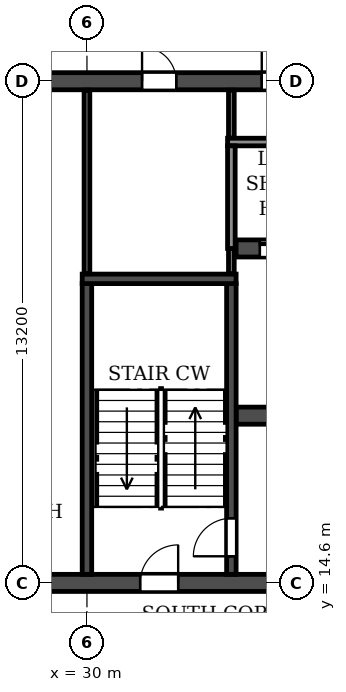
"""IFC4 building model, lengths in metres.
Left out: names, types, materials, properties, quantities, classifications, styles, units other than length and angle.
Written with IfcOpenShell. Run it as: python <this file> out.ifc"""

import sys

from ifc_helpers import new_model, si_unit, direction, frame, frame_2d, origin, place, context, subcontext, project, spatial, rectangle, extrude, element, fill, save


model = new_model("IFC4")
c1 = context("Model", 3, precision=1e-05, world=origin(), true_north=direction((0.0, 1.0)))
c2 = subcontext(c1, "Body", "Model", "MODEL_VIEW")
j1 = project(units=[si_unit("LENGTHUNIT", "METRE"), si_unit("PLANEANGLEUNIT", "RADIAN")], contexts=[c1])
p1 = place(None, origin())
s1 = spatial("IfcSite", under=j1, at=p1, CompositionType="ELEMENT")
p2 = place(p1, origin())
s2 = spatial("IfcBuilding", under=s1, at=p2, CompositionType="ELEMENT")
p3 = place(p2, frame((0.0, 0.0, 132.3)))
s3 = spatial("IfcBuildingStorey", under=s2, at=p3, CompositionType="ELEMENT", Elevation=132.3)
p4 = place(p3, frame((12.2, 14.6, 0.0), z_axis=(0.0, 0.0, 1.0), x_axis=(1.0, 0.0, 0.0)))
e1 = element("IfcWall", 1, at=p4, inside=s3, PredefinedType="SOLIDWALL", context=c2, shape_type="SweptSolid", body=[
    extrude(rectangle(XDim=77.6, YDim=0.45, at=frame_2d((38.8, 0.0))), origin(), (0.0, 0.0, 1.0), 3.07),
])
p5 = place(p4, frame((2.3, 0.0, 0.0)))
e2 = element("IfcOpeningElement", 2, at=p5, cuts=e1, PredefinedType="OPENING", context=c2, shape_type="SweptSolid", body=[
    extrude(rectangle(XDim=1.0, YDim=2.1, at=frame_2d((0.5, 1.05))), frame((0.0, 0.235, 0.0), z_axis=(0.0, -1.0, 0.0), x_axis=(1.0, 0.0, 0.0)), (0.0, 0.0, 1.0), 0.47),
])
p6 = place(p4, frame((6.7, 0.0, 0.0)))
e3 = element("IfcOpeningElement", 3, at=p6, cuts=e1, PredefinedType="OPENING", context=c2, shape_type="SweptSolid", body=[
    extrude(rectangle(XDim=1.0, YDim=2.1, at=frame_2d((0.5, 1.05))), frame((0.0, 0.235, 0.0), z_axis=(0.0, -1.0, 0.0), x_axis=(1.0, 0.0, 0.0)), (0.0, 0.0, 1.0), 0.47),
])
p7 = place(p4, frame((14.6, 0.0, 0.0)))
e4 = element("IfcOpeningElement", 4, at=p7, cuts=e1, PredefinedType="OPENING", context=c2, shape_type="SweptSolid", body=[
    extrude(rectangle(XDim=1.0, YDim=2.1, at=frame_2d((0.5, 1.05))), frame((0.0, 0.235, 0.0), z_axis=(0.0, -1.0, 0.0), x_axis=(1.0, 0.0, 0.0)), (0.0, 0.0, 1.0), 0.47),
])
p8 = place(p4, frame((19.2, 0.0, 0.0)))
e5 = element("IfcOpeningElement", 5, at=p8, cuts=e1, PredefinedType="OPENING", context=c2, shape_type="SweptSolid", body=[
    extrude(rectangle(XDim=1.0, YDim=2.1, at=frame_2d((0.5, 1.05))), frame((0.0, 0.235, 0.0), z_axis=(0.0, -1.0, 0.0), x_axis=(1.0, 0.0, 0.0)), (0.0, 0.0, 1.0), 0.47),
])
p9 = place(p4, frame((31.55, 0.0, 0.0)))
e6 = element("IfcOpeningElement", 6, at=p9, cuts=e1, PredefinedType="OPENING", context=c2, shape_type="SweptSolid", body=[
    extrude(rectangle(XDim=1.5, YDim=2.1, at=frame_2d((0.75, 1.05))), frame((0.0, 0.235, 0.0), z_axis=(0.0, -1.0, 0.0), x_axis=(1.0, 0.0, 0.0)), (0.0, 0.0, 1.0), 0.47),
])
p10 = place(p4, frame((35.7, 0.0, 0.0)))
e7 = element("IfcOpeningElement", 7, at=p10, cuts=e1, PredefinedType="OPENING", context=c2, shape_type="SweptSolid", body=[
    extrude(rectangle(XDim=1.0, YDim=2.1, at=frame_2d((0.5, 1.05))), frame((0.0, 0.235, 0.0), z_axis=(0.0, -1.0, 0.0), x_axis=(1.0, 0.0, 0.0)), (0.0, 0.0, 1.0), 0.47),
])
p11 = place(p4, frame((38.3, 0.0, 0.0)))
e8 = element("IfcOpeningElement", 8, at=p11, cuts=e1, PredefinedType="OPENING", context=c2, shape_type="SweptSolid", body=[
    extrude(rectangle(XDim=1.0, YDim=2.1, at=frame_2d((0.5, 1.05))), frame((0.0, 0.235, 0.0), z_axis=(0.0, -1.0, 0.0), x_axis=(1.0, 0.0, 0.0)), (0.0, 0.0, 1.0), 0.47),
])
p12 = place(p4, frame((40.9, 0.0, 0.0)))
e9 = element("IfcOpeningElement", 9, at=p12, cuts=e1, PredefinedType="OPENING", context=c2, shape_type="SweptSolid", body=[
    extrude(rectangle(XDim=1.0, YDim=2.1, at=frame_2d((0.5, 1.05))), frame((0.0, 0.235, 0.0), z_axis=(0.0, -1.0, 0.0), x_axis=(1.0, 0.0, 0.0)), (0.0, 0.0, 1.0), 0.47),
])
p13 = place(p4, frame((44.55, 0.0, 0.0)))
e10 = element("IfcOpeningElement", 10, at=p13, cuts=e1, PredefinedType="OPENING", context=c2, shape_type="SweptSolid", body=[
    extrude(rectangle(XDim=1.5, YDim=2.1, at=frame_2d((0.75, 1.05))), frame((0.0, 0.235, 0.0), z_axis=(0.0, -1.0, 0.0), x_axis=(1.0, 0.0, 0.0)), (0.0, 0.0, 1.0), 0.47),
])
p14 = place(p4, frame((57.4, 0.0, 0.0)))
e11 = element("IfcOpeningElement", 11, at=p14, cuts=e1, PredefinedType="OPENING", context=c2, shape_type="SweptSolid", body=[
    extrude(rectangle(XDim=1.0, YDim=2.1, at=frame_2d((0.5, 1.05))), frame((0.0, 0.235, 0.0), z_axis=(0.0, -1.0, 0.0), x_axis=(1.0, 0.0, 0.0)), (0.0, 0.0, 1.0), 0.47),
])
p15 = place(p4, frame((62.0, 0.0, 0.0)))
e12 = element("IfcOpeningElement", 12, at=p15, cuts=e1, PredefinedType="OPENING", context=c2, shape_type="SweptSolid", body=[
    extrude(rectangle(XDim=1.0, YDim=2.1, at=frame_2d((0.5, 1.05))), frame((0.0, 0.235, 0.0), z_axis=(0.0, -1.0, 0.0), x_axis=(1.0, 0.0, 0.0)), (0.0, 0.0, 1.0), 0.47),
])
p16 = place(p4, frame((69.9, 0.0, 0.0)))
e13 = element("IfcOpeningElement", 13, at=p16, cuts=e1, PredefinedType="OPENING", context=c2, shape_type="SweptSolid", body=[
    extrude(rectangle(XDim=1.0, YDim=2.1, at=frame_2d((0.5, 1.05))), frame((0.0, 0.235, 0.0), z_axis=(0.0, -1.0, 0.0), x_axis=(1.0, 0.0, 0.0)), (0.0, 0.0, 1.0), 0.47),
])
p17 = place(p4, frame((74.3, 0.0, 0.0)))
e14 = element("IfcOpeningElement", 14, at=p17, cuts=e1, PredefinedType="OPENING", context=c2, shape_type="SweptSolid", body=[
    extrude(rectangle(XDim=1.0, YDim=2.1, at=frame_2d((0.5, 1.05))), frame((0.0, 0.235, 0.0), z_axis=(0.0, -1.0, 0.0), x_axis=(1.0, 0.0, 0.0)), (0.0, 0.0, 1.0), 0.47),
])
p18 = place(p3, frame((12.2, 27.8, 0.0), z_axis=(0.0, 0.0, 1.0), x_axis=(1.0, 0.0, 0.0)))
e15 = element("IfcWall", 15, at=p18, inside=s3, PredefinedType="SOLIDWALL", context=c2, shape_type="SweptSolid", body=[
    extrude(rectangle(XDim=77.6, YDim=0.45, at=frame_2d((38.8, 0.0))), origin(), (0.0, 0.0, 1.0), 3.07),
])
p19 = place(p18, frame((2.05, 0.0, 0.0)))
e16 = element("IfcOpeningElement", 16, at=p19, cuts=e15, PredefinedType="OPENING", context=c2, shape_type="SweptSolid", body=[
    extrude(rectangle(XDim=1.5, YDim=2.1, at=frame_2d((0.75, 1.05))), frame((0.0, 0.235, 0.0), z_axis=(0.0, -1.0, 0.0), x_axis=(1.0, 0.0, 0.0)), (0.0, 0.0, 1.0), 0.47),
])
p20 = place(p18, frame((6.7, 0.0, 0.0)))
e17 = element("IfcOpeningElement", 17, at=p20, cuts=e15, PredefinedType="OPENING", context=c2, shape_type="SweptSolid", body=[
    extrude(rectangle(XDim=1.0, YDim=2.1, at=frame_2d((0.5, 1.05))), frame((0.0, 0.235, 0.0), z_axis=(0.0, -1.0, 0.0), x_axis=(1.0, 0.0, 0.0)), (0.0, 0.0, 1.0), 0.47),
])
p21 = place(p18, frame((10.05, 0.0, 0.0)))
e18 = element("IfcOpeningElement", 18, at=p21, cuts=e15, PredefinedType="OPENING", context=c2, shape_type="SweptSolid", body=[
    extrude(rectangle(XDim=0.9, YDim=2.1, at=frame_2d((0.45, 1.05))), frame((0.0, 0.235, 0.0), z_axis=(0.0, -1.0, 0.0), x_axis=(1.0, 0.0, 0.0)), (0.0, 0.0, 1.0), 0.47),
])
p22 = place(p18, frame((19.25, 0.0, 0.0)))
e19 = element("IfcOpeningElement", 19, at=p22, cuts=e15, PredefinedType="OPENING", context=c2, shape_type="SweptSolid", body=[
    extrude(rectangle(XDim=0.9, YDim=2.1, at=frame_2d((0.45, 1.05))), frame((0.0, 0.235, 0.0), z_axis=(0.0, -1.0, 0.0), x_axis=(1.0, 0.0, 0.0)), (0.0, 0.0, 1.0), 0.47),
])
p23 = place(p18, frame((22.4, 0.0, 0.0)))
e20 = element("IfcOpeningElement", 20, at=p23, cuts=e15, PredefinedType="OPENING", context=c2, shape_type="SweptSolid", body=[
    extrude(rectangle(XDim=1.0, YDim=2.1, at=frame_2d((0.5, 1.05))), frame((0.0, 0.235, 0.0), z_axis=(0.0, -1.0, 0.0), x_axis=(1.0, 0.0, 0.0)), (0.0, 0.0, 1.0), 0.47),
])
p24 = place(p18, frame((27.6, 0.0, 0.0)))
e21 = element("IfcOpeningElement", 21, at=p24, cuts=e15, PredefinedType="OPENING", context=c2, shape_type="SweptSolid", body=[
    extrude(rectangle(XDim=1.0, YDim=2.1, at=frame_2d((0.5, 1.05))), frame((0.0, 0.235, 0.0), z_axis=(0.0, -1.0, 0.0), x_axis=(1.0, 0.0, 0.0)), (0.0, 0.0, 1.0), 0.47),
])
p25 = place(p18, frame((35.4, 0.0, 0.0)))
e22 = element("IfcOpeningElement", 22, at=p25, cuts=e15, PredefinedType="OPENING", context=c2, shape_type="SweptSolid", body=[
    extrude(rectangle(XDim=1.0, YDim=2.1, at=frame_2d((0.5, 1.05))), frame((0.0, 0.235, 0.0), z_axis=(0.0, -1.0, 0.0), x_axis=(1.0, 0.0, 0.0)), (0.0, 0.0, 1.0), 0.47),
])
p26 = place(p18, frame((38.3, 0.0, 0.0)))
e23 = element("IfcOpeningElement", 23, at=p26, cuts=e15, PredefinedType="OPENING", context=c2, shape_type="SweptSolid", body=[
    extrude(rectangle(XDim=1.0, YDim=2.1, at=frame_2d((0.5, 1.05))), frame((0.0, 0.235, 0.0), z_axis=(0.0, -1.0, 0.0), x_axis=(1.0, 0.0, 0.0)), (0.0, 0.0, 1.0), 0.47),
])
p27 = place(p18, frame((41.2, 0.0, 0.0)))
e24 = element("IfcOpeningElement", 24, at=p27, cuts=e15, PredefinedType="OPENING", context=c2, shape_type="SweptSolid", body=[
    extrude(rectangle(XDim=1.0, YDim=2.1, at=frame_2d((0.5, 1.05))), frame((0.0, 0.235, 0.0), z_axis=(0.0, -1.0, 0.0), x_axis=(1.0, 0.0, 0.0)), (0.0, 0.0, 1.0), 0.47),
])
p28 = place(p18, frame((43.8, 0.0, 0.0)))
e25 = element("IfcOpeningElement", 25, at=p28, cuts=e15, PredefinedType="OPENING", context=c2, shape_type="SweptSolid", body=[
    extrude(rectangle(XDim=1.0, YDim=2.1, at=frame_2d((0.5, 1.05))), frame((0.0, 0.235, 0.0), z_axis=(0.0, -1.0, 0.0), x_axis=(1.0, 0.0, 0.0)), (0.0, 0.0, 1.0), 0.47),
])
p29 = place(p18, frame((47.7, 0.0, 0.0)))
e26 = element("IfcOpeningElement", 26, at=p29, cuts=e15, PredefinedType="OPENING", context=c2, shape_type="SweptSolid", body=[
    extrude(rectangle(XDim=1.0, YDim=2.1, at=frame_2d((0.5, 1.05))), frame((0.0, 0.235, 0.0), z_axis=(0.0, -1.0, 0.0), x_axis=(1.0, 0.0, 0.0)), (0.0, 0.0, 1.0), 0.47),
])
p30 = place(p18, frame((51.6, 0.0, 0.0)))
e27 = element("IfcOpeningElement", 27, at=p30, cuts=e15, PredefinedType="OPENING", context=c2, shape_type="SweptSolid", body=[
    extrude(rectangle(XDim=1.0, YDim=2.1, at=frame_2d((0.5, 1.05))), frame((0.0, 0.235, 0.0), z_axis=(0.0, -1.0, 0.0), x_axis=(1.0, 0.0, 0.0)), (0.0, 0.0, 1.0), 0.47),
])
p31 = place(p18, frame((54.2, 0.0, 0.0)))
e28 = element("IfcOpeningElement", 28, at=p31, cuts=e15, PredefinedType="OPENING", context=c2, shape_type="SweptSolid", body=[
    extrude(rectangle(XDim=1.0, YDim=2.1, at=frame_2d((0.5, 1.05))), frame((0.0, 0.235, 0.0), z_axis=(0.0, -1.0, 0.0), x_axis=(1.0, 0.0, 0.0)), (0.0, 0.0, 1.0), 0.47),
])
p32 = place(p18, frame((57.45, 0.0, 0.0)))
e29 = element("IfcOpeningElement", 29, at=p32, cuts=e15, PredefinedType="OPENING", context=c2, shape_type="SweptSolid", body=[
    extrude(rectangle(XDim=0.9, YDim=2.1, at=frame_2d((0.45, 1.05))), frame((0.0, 0.235, 0.0), z_axis=(0.0, -1.0, 0.0), x_axis=(1.0, 0.0, 0.0)), (0.0, 0.0, 1.0), 0.47),
])
p33 = place(p18, frame((66.65, 0.0, 0.0)))
e30 = element("IfcOpeningElement", 30, at=p33, cuts=e15, PredefinedType="OPENING", context=c2, shape_type="SweptSolid", body=[
    extrude(rectangle(XDim=0.9, YDim=2.1, at=frame_2d((0.45, 1.05))), frame((0.0, 0.235, 0.0), z_axis=(0.0, -1.0, 0.0), x_axis=(1.0, 0.0, 0.0)), (0.0, 0.0, 1.0), 0.47),
])
p34 = place(p18, frame((69.9, 0.0, 0.0)))
e31 = element("IfcOpeningElement", 31, at=p34, cuts=e15, PredefinedType="OPENING", context=c2, shape_type="SweptSolid", body=[
    extrude(rectangle(XDim=1.0, YDim=2.1, at=frame_2d((0.5, 1.05))), frame((0.0, 0.235, 0.0), z_axis=(0.0, -1.0, 0.0), x_axis=(1.0, 0.0, 0.0)), (0.0, 0.0, 1.0), 0.47),
])
p35 = place(p18, frame((74.3, 0.0, 0.0)))
e32 = element("IfcOpeningElement", 32, at=p35, cuts=e15, PredefinedType="OPENING", context=c2, shape_type="SweptSolid", body=[
    extrude(rectangle(XDim=1.0, YDim=2.1, at=frame_2d((0.5, 1.05))), frame((0.0, 0.235, 0.0), z_axis=(0.0, -1.0, 0.0), x_axis=(1.0, 0.0, 0.0)), (0.0, 0.0, 1.0), 0.47),
])
p36 = place(p3, frame((33.925, 19.0, 0.0), z_axis=(0.0, 0.0, 1.0), x_axis=(1.0, 0.0, 0.0)))
e33 = element("IfcWall", 33, at=p36, inside=s3, PredefinedType="SOLIDWALL", context=c2, shape_type="SweptSolid", body=[
    extrude(rectangle(XDim=34.15, YDim=0.45, at=frame_2d((17.075, 0.0))), origin(), (0.0, 0.0, 1.0), 3.07),
])
p37 = place(p36, frame((16.175, 0.0, 0.0)))
e34 = element("IfcOpeningElement", 34, at=p37, cuts=e33, PredefinedType="OPENING", context=c2, shape_type="SweptSolid", body=[
    extrude(rectangle(XDim=1.8, YDim=2.1, at=frame_2d((0.9, 1.05))), frame((0.0, 0.235, 0.0), z_axis=(0.0, -1.0, 0.0), x_axis=(1.0, 0.0, 0.0)), (0.0, 0.0, 1.0), 0.47),
])
p38 = place(p36, frame((1.525, 0.0, 0.0)))
e35 = element("IfcOpeningElement", 35, at=p38, cuts=e33, PredefinedType="OPENING", context=c2, shape_type="SweptSolid", body=[
    extrude(rectangle(XDim=1.8, YDim=2.1, at=frame_2d((0.9, 1.05))), frame((0.0, 0.235, 0.0), z_axis=(0.0, -1.0, 0.0), x_axis=(1.0, 0.0, 0.0)), (0.0, 0.0, 1.0), 0.47),
])
p39 = place(p36, frame((30.825, 0.0, 0.0)))
e36 = element("IfcOpeningElement", 36, at=p39, cuts=e33, PredefinedType="OPENING", context=c2, shape_type="SweptSolid", body=[
    extrude(rectangle(XDim=1.8, YDim=2.1, at=frame_2d((0.9, 1.05))), frame((0.0, 0.235, 0.0), z_axis=(0.0, -1.0, 0.0), x_axis=(1.0, 0.0, 0.0)), (0.0, 0.0, 1.0), 0.47),
])
p40 = place(p3, frame((33.925, 23.4, 0.0), z_axis=(0.0, 0.0, 1.0), x_axis=(1.0, 0.0, 0.0)))
e37 = element("IfcWall", 37, at=p40, inside=s3, PredefinedType="SOLIDWALL", context=c2, shape_type="SweptSolid", body=[
    extrude(rectangle(XDim=34.15, YDim=0.45, at=frame_2d((17.075, 0.0))), origin(), (0.0, 0.0, 1.0), 3.07),
])
p41 = place(p40, frame((16.175, 0.0, 0.0)))
e38 = element("IfcOpeningElement", 38, at=p41, cuts=e37, PredefinedType="OPENING", context=c2, shape_type="SweptSolid", body=[
    extrude(rectangle(XDim=1.8, YDim=2.1, at=frame_2d((0.9, 1.05))), frame((0.0, 0.235, 0.0), z_axis=(0.0, -1.0, 0.0), x_axis=(1.0, 0.0, 0.0)), (0.0, 0.0, 1.0), 0.47),
])
p42 = place(p40, frame((0.625, 0.0, 0.0)))
e39 = element("IfcOpeningElement", 39, at=p42, cuts=e37, PredefinedType="OPENING", context=c2, shape_type="SweptSolid", body=[
    extrude(rectangle(XDim=1.1, YDim=2.1, at=frame_2d((0.55, 1.05))), frame((0.0, 0.235, 0.0), z_axis=(0.0, -1.0, 0.0), x_axis=(1.0, 0.0, 0.0)), (0.0, 0.0, 1.0), 0.47),
])
p43 = place(p40, frame((3.225, 0.0, 0.0)))
e40 = element("IfcOpeningElement", 40, at=p43, cuts=e37, PredefinedType="OPENING", context=c2, shape_type="SweptSolid", body=[
    extrude(rectangle(XDim=1.1, YDim=2.1, at=frame_2d((0.55, 1.05))), frame((0.0, 0.235, 0.0), z_axis=(0.0, -1.0, 0.0), x_axis=(1.0, 0.0, 0.0)), (0.0, 0.0, 1.0), 0.47),
])
p44 = place(p40, frame((5.825, 0.0, 0.0)))
e41 = element("IfcOpeningElement", 41, at=p44, cuts=e37, PredefinedType="OPENING", context=c2, shape_type="SweptSolid", body=[
    extrude(rectangle(XDim=1.1, YDim=2.1, at=frame_2d((0.55, 1.05))), frame((0.0, 0.235, 0.0), z_axis=(0.0, -1.0, 0.0), x_axis=(1.0, 0.0, 0.0)), (0.0, 0.0, 1.0), 0.47),
])
p45 = place(p40, frame((8.425, 0.0, 0.0)))
e42 = element("IfcOpeningElement", 42, at=p45, cuts=e37, PredefinedType="OPENING", context=c2, shape_type="SweptSolid", body=[
    extrude(rectangle(XDim=1.1, YDim=2.1, at=frame_2d((0.55, 1.05))), frame((0.0, 0.235, 0.0), z_axis=(0.0, -1.0, 0.0), x_axis=(1.0, 0.0, 0.0)), (0.0, 0.0, 1.0), 0.47),
])
p46 = place(p40, frame((11.025, 0.0, 0.0)))
e43 = element("IfcOpeningElement", 43, at=p46, cuts=e37, PredefinedType="OPENING", context=c2, shape_type="SweptSolid", body=[
    extrude(rectangle(XDim=1.1, YDim=2.1, at=frame_2d((0.55, 1.05))), frame((0.0, 0.235, 0.0), z_axis=(0.0, -1.0, 0.0), x_axis=(1.0, 0.0, 0.0)), (0.0, 0.0, 1.0), 0.47),
])
p47 = place(p40, frame((13.625, 0.0, 0.0)))
e44 = element("IfcOpeningElement", 44, at=p47, cuts=e37, PredefinedType="OPENING", context=c2, shape_type="SweptSolid", body=[
    extrude(rectangle(XDim=1.1, YDim=2.1, at=frame_2d((0.55, 1.05))), frame((0.0, 0.235, 0.0), z_axis=(0.0, -1.0, 0.0), x_axis=(1.0, 0.0, 0.0)), (0.0, 0.0, 1.0), 0.47),
])
p48 = place(p40, frame((27.225, 0.0, 0.0)))
e45 = element("IfcOpeningElement", 45, at=p48, cuts=e37, PredefinedType="OPENING", context=c2, shape_type="SweptSolid", body=[
    extrude(rectangle(XDim=1.1, YDim=2.1, at=frame_2d((0.55, 1.05))), frame((0.0, 0.235, 0.0), z_axis=(0.0, -1.0, 0.0), x_axis=(1.0, 0.0, 0.0)), (0.0, 0.0, 1.0), 0.47),
])
p49 = place(p3, frame((30.0, 14.825, 0.0), z_axis=(0.0, 0.0, 1.0), x_axis=(0.0, 1.0, 0.0)))
e46 = element("IfcWall", 46, at=p49, inside=s3, PredefinedType="SOLIDWALL", context=c2, shape_type="SweptSolid", body=[
    extrude(rectangle(XDim=7.65, YDim=0.25, at=frame_2d((3.825, 0.0))), origin(), (0.0, 0.0, 1.0), 3.07),
])
p50 = place(p3, frame((33.8, 14.825, 0.0), z_axis=(0.0, 0.0, 1.0), x_axis=(0.0, 1.0, 0.0)))
e47 = element("IfcWall", 47, at=p50, inside=s3, PredefinedType="SOLIDWALL", context=c2, shape_type="SweptSolid", body=[
    extrude(rectangle(XDim=7.65, YDim=0.25, at=frame_2d((3.825, 0.0))), origin(), (0.0, 0.0, 1.0), 3.07),
])
p51 = place(p50, frame((0.475, 0.0, 0.0)))
e48 = element("IfcOpeningElement", 48, at=p51, cuts=e47, PredefinedType="OPENING", context=c2, shape_type="SweptSolid", body=[
    extrude(rectangle(XDim=1.0, YDim=2.1, at=frame_2d((0.5, 1.05))), frame((0.0, 0.135, 0.0), z_axis=(0.0, -1.0, 0.0), x_axis=(1.0, 0.0, 0.0)), (0.0, 0.0, 1.0), 0.27),
])
p52 = place(p3, frame((29.875, 22.6, 0.0), z_axis=(0.0, 0.0, 1.0), x_axis=(1.0, 0.0, 0.0)))
e49 = element("IfcWall", 49, at=p52, inside=s3, PredefinedType="SOLIDWALL", context=c2, shape_type="SweptSolid", body=[
    extrude(rectangle(XDim=4.05, YDim=0.25, at=frame_2d((2.025, 0.0))), origin(), (0.0, 0.0, 1.0), 3.07),
])
p53 = place(p3, frame((30.0, 22.735, 0.0), z_axis=(0.0, 0.0, 1.0), x_axis=(0.0, 1.0, 0.0)))
e50 = element("IfcWall", 50, at=p53, inside=s3, PredefinedType="PARTITIONING", context=c2, shape_type="SweptSolid", body=[
    extrude(rectangle(XDim=4.83, YDim=0.15, at=frame_2d((2.415, 0.0))), origin(), (0.0, 0.0, 1.0), 3.07),
])
p54 = place(p3, frame((33.8, 22.735, 0.0), z_axis=(0.0, 0.0, 1.0), x_axis=(0.0, 1.0, 0.0)))
e51 = element("IfcWall", 51, at=p54, inside=s3, PredefinedType="PARTITIONING", context=c2, shape_type="SweptSolid", body=[
    extrude(rectangle(XDim=0.665, YDim=0.15, at=frame_2d((0.333, 0.0))), origin(), (0.0, 0.0, 1.0), 3.07),
])
p55 = place(p3, frame((33.8, 26.3, 0.0), z_axis=(0.0, 0.0, 1.0), x_axis=(0.0, 1.0, 0.0)))
e52 = element("IfcWall", 52, at=p55, inside=s3, PredefinedType="PARTITIONING", context=c2, shape_type="SweptSolid", body=[
    extrude(rectangle(XDim=1.265, YDim=0.15, at=frame_2d((0.632, 0.0))), origin(), (0.0, 0.0, 1.0), 3.07),
])
p56 = place(p3, frame((33.7, 26.2, 0.0), z_axis=(0.0, 0.0, 1.0), x_axis=(1.0, 0.0, 0.0)))
e53 = element("IfcWall", 53, at=p56, inside=s3, PredefinedType="PARTITIONING", context=c2, shape_type="SweptSolid", body=[
    extrude(rectangle(XDim=10.4, YDim=0.2, at=frame_2d((5.2, 0.0))), origin(), (0.0, 0.0, 1.0), 3.07),
])
p57 = place(p3, frame((33.8, 23.4, 0.0), z_axis=(0.0, 0.0, 1.0), x_axis=(0.0, 1.0, 0.0)))
e54 = element("IfcWall", 54, at=p57, inside=s3, PredefinedType="PARTITIONING", context=c2, shape_type="SweptSolid", body=[
    extrude(rectangle(XDim=2.7, YDim=0.2, at=frame_2d((1.35, 0.0))), origin(), (0.0, 0.0, 1.0), 3.07),
])
p58 = place(p22, origin())
e55 = element("IfcDoor", 55, at=p58, inside=s3, OperationType="SINGLE_SWING_LEFT", PredefinedType="DOOR", context=c2, shape_type="SweptSolid", body=[
    extrude(rectangle(XDim=0.9, YDim=2.1, at=frame_2d((0.45, 1.05))), frame((0.0, 0.025, 0.0), z_axis=(0.0, -1.0, 0.0), x_axis=(1.0, 0.0, 0.0)), (0.0, 0.0, 1.0), 0.05),
])
fill(e19, e55)
p59 = place(p23, origin())
e56 = element("IfcDoor", 56, at=p59, inside=s3, OperationType="SINGLE_SWING_LEFT", PredefinedType="DOOR", context=c2, shape_type="SweptSolid", body=[
    extrude(rectangle(XDim=1.0, YDim=2.1, at=frame_2d((0.5, 1.05))), frame((0.0, 0.025, 0.0), z_axis=(0.0, -1.0, 0.0), x_axis=(1.0, 0.0, 0.0)), (0.0, 0.0, 1.0), 0.05),
])
fill(e20, e56)
p60 = place(p8, origin())
e57 = element("IfcDoor", 57, at=p60, inside=s3, OperationType="SINGLE_SWING_RIGHT", PredefinedType="DOOR", context=c2, shape_type="SweptSolid", body=[
    extrude(rectangle(XDim=1.0, YDim=2.1, at=frame_2d((0.5, 1.05))), frame((0.0, 0.025, 0.0), z_axis=(0.0, -1.0, 0.0), x_axis=(1.0, 0.0, 0.0)), (0.0, 0.0, 1.0), 0.05),
])
fill(e5, e57)
p61 = place(p51, origin())
e58 = element("IfcDoor", 58, at=p61, inside=s3, OperationType="SINGLE_SWING_LEFT", PredefinedType="DOOR", context=c2, shape_type="SweptSolid", body=[
    extrude(rectangle(XDim=1.0, YDim=2.1, at=frame_2d((0.5, 1.05))), frame((0.0, 0.025, 0.0), z_axis=(0.0, -1.0, 0.0), x_axis=(1.0, 0.0, 0.0)), (0.0, 0.0, 1.0), 0.05),
])
fill(e48, e58)
p62 = place(p42, origin())
e59 = element("IfcDoor", 59, at=p62, inside=s3, OperationType="DOUBLE_DOOR_SLIDING", PredefinedType="DOOR", context=c2, shape_type="SweptSolid", body=[
    extrude(rectangle(XDim=1.1, YDim=2.1, at=frame_2d((0.55, 1.05))), frame((0.0, 0.025, 0.0), z_axis=(0.0, -1.0, 0.0), x_axis=(1.0, 0.0, 0.0)), (0.0, 0.0, 1.0), 0.05),
])
fill(e39, e59)
save(model, sys.argv[1])
